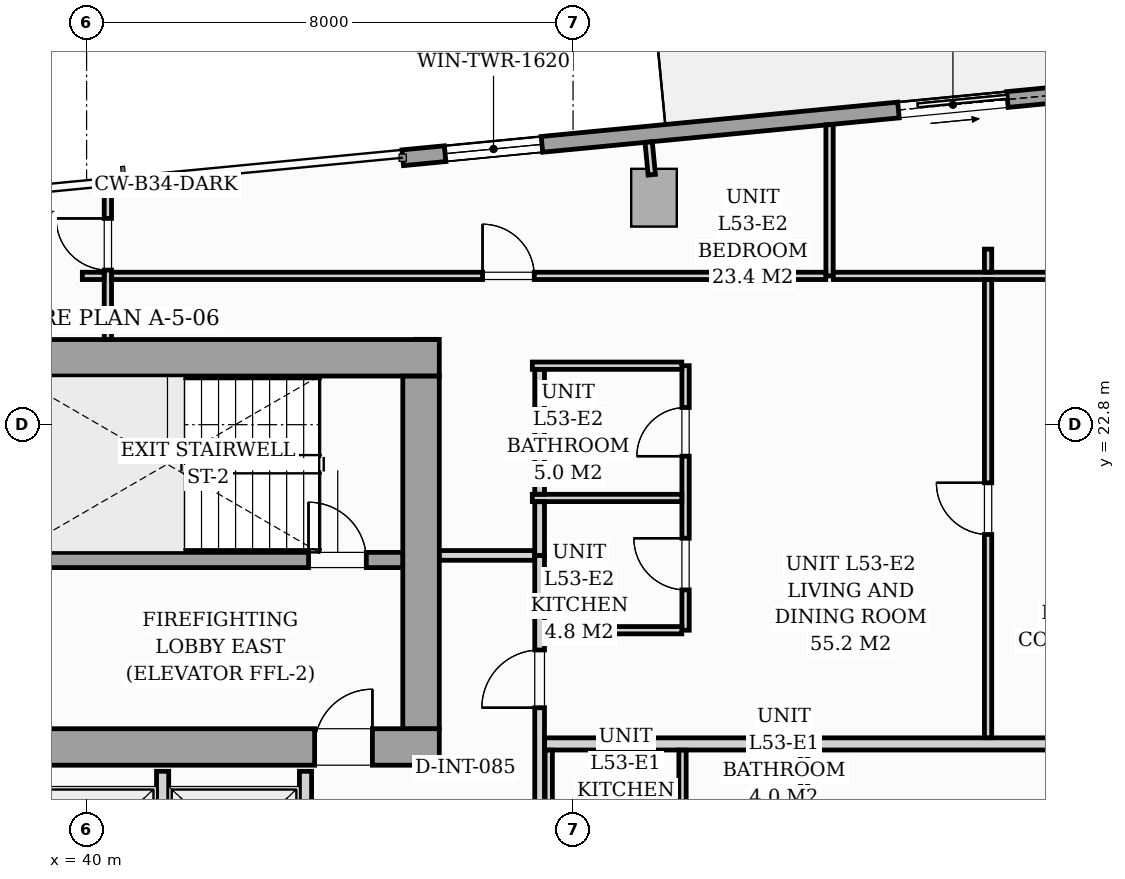
"""IFC4 building model, lengths in metres.
Left out: names, types, materials, properties, quantities, classifications, styles, units other than length and angle.
Written with IfcOpenShell. Run it as: python <this file> out.ifc"""

import sys

from ifc_helpers import new_model, si_unit, direction, frame, frame_2d, origin, origin_2d, place, context, subcontext, project, spatial, rectangle, i_section, extrude, source, transform, mapped, element, fill, save


model = new_model("IFC4")
c1 = context("Model", 3, precision=1e-05, world=origin(), true_north=direction((0.0, 1.0)))
c2 = subcontext(c1, "Body", "Model", "MODEL_VIEW")
j1 = project(units=[si_unit("LENGTHUNIT", "METRE"), si_unit("PLANEANGLEUNIT", "RADIAN")], contexts=[c1])
p1 = place(None, origin())
s1 = spatial("IfcSite", under=j1, at=p1, CompositionType="ELEMENT")
p2 = place(p1, origin())
s2 = spatial("IfcBuilding", under=s1, at=p2, CompositionType="ELEMENT")
p3 = place(p2, frame((0.0, 0.0, 185.8)))
s3 = spatial("IfcBuildingStorey", under=s2, at=p3, CompositionType="ELEMENT", Elevation=185.8)
m1 = source(origin(), c2, "Body", "SweptSolid", [
    extrude(i_section(OverallWidth=0.416, OverallDepth=0.446, WebThickness=0.039, FlangeThickness=0.063, FilletRadius=0.018, at=origin_2d()), origin(), (0.0, 0.0, 1.0), 3.196),
])
for number, where, z_axis, x_axis in (
    (1, (45.6, 17.4, 0.002), (0.0, 0.0, 1.0), (1.0, 0.0, 0.0)),
    (2, (45.6, 24.0, 0.002), (0.0, 0.0, 1.0), (1.0, 0.0, 0.0)),
):
    element("IfcColumn", number, at=place(p3, frame(where, z_axis=z_axis, x_axis=x_axis)), inside=s3, PredefinedType="PILASTER", context=c2, shape_type="MappedRepresentation", body=[
        mapped(m1, transform((0.0, 0.0, 0.0), scale=1.0)),
    ])
m2 = source(origin(), c2, "Body", "SweptSolid", [
    extrude(rectangle(XDim=0.75, YDim=0.95, at=origin_2d()), origin(), (0.0, 0.0, 1.0), 3.196),
])
p4 = place(p3, frame((49.331, 26.533, 0.002), z_axis=(0.0, 0.0, 1.0), x_axis=(0.995396198367, 0.09584575252, 0.0)))
e3 = element("IfcColumn", 3, at=p4, inside=s3, PredefinedType="COLUMN", context=c2, shape_type="MappedRepresentation", body=[
    mapped(m2, transform((0.0, 0.0, 0.0), scale=1.0)),
])
p5 = place(p3, frame((45.199, 27.19, 0.0), z_axis=(0.0, 0.0, 1.0), x_axis=(0.995397074604, 0.095836652014, 0.0)))
e4 = element("IfcWall", 4, at=p5, inside=s3, PredefinedType="STANDARD", context=c2, shape_type="SweptSolid", body=[
    extrude(rectangle(XDim=16.1, YDim=0.26, at=frame_2d((8.05, 0.0))), origin(), (0.0, 0.0, 1.0), 2.94),
])
p6 = place(p5, frame((8.19, 0.0, 0.0)))
e5 = element("IfcOpeningElement", 5, at=p6, cuts=e4, PredefinedType="OPENING", context=c2, shape_type="SweptSolid", body=[
    extrude(rectangle(XDim=1.8, YDim=2.06, at=frame_2d((0.9, 1.03))), frame((0.0, 0.14, 0.0), z_axis=(0.0, -1.0, 0.0), x_axis=(1.0, 0.0, 0.0)), (0.0, 0.0, 1.0), 0.28),
])
p7 = place(p5, frame((0.7, 0.0, 0.65)))
e6 = element("IfcOpeningElement", 6, at=p7, cuts=e4, PredefinedType="OPENING", context=c2, shape_type="SweptSolid", body=[
    extrude(rectangle(XDim=1.6, YDim=1.5, at=frame_2d((0.8, 0.75))), frame((0.0, 0.14, 0.0), z_axis=(0.0, -1.0, 0.0), x_axis=(1.0, 0.0, 0.0)), (0.0, 0.0, 1.0), 0.28),
])
p8 = place(p3, frame((26.2, 17.5, 0.0), z_axis=(0.0, 0.0, 1.0), x_axis=(1.0, 0.0, 0.0)))
e7 = element("IfcWall", 7, at=p8, inside=s3, PredefinedType="SHEAR", context=c2, shape_type="SweptSolid", body=[
    extrude(rectangle(XDim=19.6, YDim=0.6, at=frame_2d((9.8, 0.0))), origin(), (0.0, 0.0, 1.0), 3.2),
])
p9 = place(p8, frame((0.95, 0.0, 0.0)))
e8 = element("IfcOpeningElement", 8, at=p9, cuts=e7, PredefinedType="OPENING", context=c2, shape_type="SweptSolid", body=[
    extrude(rectangle(XDim=0.95, YDim=2.06, at=frame_2d((0.475, 1.03))), frame((0.0, 0.31, 0.0), z_axis=(0.0, -1.0, 0.0), x_axis=(1.0, 0.0, 0.0)), (0.0, 0.0, 1.0), 0.62),
])
p10 = place(p8, frame((9.38, 0.0, 0.0)))
e9 = element("IfcOpeningElement", 9, at=p10, cuts=e7, PredefinedType="OPENING", context=c2, shape_type="SweptSolid", body=[
    extrude(rectangle(XDim=0.85, YDim=2.0, at=frame_2d((0.425, 1.0))), frame((0.0, 0.31, 0.0), z_axis=(0.0, -1.0, 0.0), x_axis=(1.0, 0.0, 0.0)), (0.0, 0.0, 1.0), 0.62),
])
p11 = place(p8, frame((17.55, 0.0, 0.0)))
e10 = element("IfcOpeningElement", 10, at=p11, cuts=e7, PredefinedType="OPENING", context=c2, shape_type="SweptSolid", body=[
    extrude(rectangle(XDim=0.95, YDim=2.06, at=frame_2d((0.475, 1.03))), frame((0.0, 0.31, 0.0), z_axis=(0.0, -1.0, 0.0), x_axis=(1.0, 0.0, 0.0)), (0.0, 0.0, 1.0), 0.62),
])
p12 = place(p3, frame((26.2, 23.9, 0.0), z_axis=(0.0, 0.0, 1.0), x_axis=(1.0, 0.0, 0.0)))
e11 = element("IfcWall", 11, at=p12, inside=s3, PredefinedType="SHEAR", context=c2, shape_type="SweptSolid", body=[
    extrude(rectangle(XDim=19.6, YDim=0.6, at=frame_2d((9.8, 0.0))), origin(), (0.0, 0.0, 1.0), 3.2),
])
p13 = place(p3, frame((45.5, 17.802, 0.0), z_axis=(0.0, 0.0, 1.0), x_axis=(0.0, 1.0, 0.0)))
e12 = element("IfcWall", 12, at=p13, inside=s3, PredefinedType="SHEAR", context=c2, shape_type="SweptSolid", body=[
    extrude(rectangle(XDim=5.796, YDim=0.6, at=frame_2d((2.898, 0.0))), origin(), (0.0, 0.0, 1.0), 3.2),
])
p14 = place(p3, frame((37.05, 20.575, 0.0), z_axis=(0.0, 0.0, 1.0), x_axis=(1.0, 0.0, 0.0)))
e13 = element("IfcWall", 13, at=p14, inside=s3, PredefinedType="SOLIDWALL", context=c2, shape_type="SweptSolid", body=[
    extrude(rectangle(XDim=8.148, YDim=0.25, at=frame_2d((4.074, 0.0))), origin(), (0.0, 0.0, 1.0), 3.2),
])
p15 = place(p14, frame((6.6, 0.0, 0.0)))
e14 = element("IfcOpeningElement", 14, at=p15, cuts=e13, PredefinedType="OPENING", context=c2, shape_type="SweptSolid", body=[
    extrude(rectangle(XDim=0.95, YDim=2.06, at=frame_2d((0.475, 1.03))), frame((0.0, 0.135, 0.0), z_axis=(0.0, -1.0, 0.0), x_axis=(1.0, 0.0, 0.0)), (0.0, 0.0, 1.0), 0.27),
])
for number, where, z_axis, x_axis in (
    (15, (41.25, 14.75, 0.0), (0.0, 0.0, 1.0), (0.0, 1.0, 0.0)),
    (16, (43.6, 14.75, 0.0), (0.0, 0.0, 1.0), (0.0, 1.0, 0.0)),
):
    element("IfcWall", number, at=place(p3, frame(where, z_axis=z_axis, x_axis=x_axis)), inside=s3, PredefinedType="PARTITIONING", context=c2, shape_type="SweptSolid", body=[
        extrude(rectangle(XDim=2.35, YDim=0.2, at=frame_2d((1.175, 0.0))), origin(), (0.0, 0.0, 1.0), 2.94),
    ])
p16 = place(p3, frame((47.45, 13.362, 0.0), z_axis=(0.0, 0.0, 1.0), x_axis=(0.0, 1.0, 0.0)))
e17 = element("IfcWall", 17, at=p16, inside=s3, PredefinedType="PARTITIONING", context=c2, shape_type="SweptSolid", body=[
    extrude(rectangle(XDim=7.288, YDim=0.16, at=frame_2d((3.644, 0.0))), origin(), (0.0, 0.0, 1.0), 2.94),
])
p17 = place(p16, frame((0.493, 0.0, 0.0)))
e18 = element("IfcOpeningElement", 18, at=p17, cuts=e17, PredefinedType="OPENING", context=c2, shape_type="SweptSolid", body=[
    extrude(rectangle(XDim=0.95, YDim=2.06, at=frame_2d((0.475, 1.03))), frame((0.0, 0.09, 0.0), z_axis=(0.0, -1.0, 0.0), x_axis=(1.0, 0.0, 0.0)), (0.0, 0.0, 1.0), 0.18),
])
p18 = place(p16, frame((4.783, 0.0, 0.0)))
e19 = element("IfcOpeningElement", 19, at=p18, cuts=e17, PredefinedType="OPENING", context=c2, shape_type="SweptSolid", body=[
    extrude(rectangle(XDim=0.95, YDim=2.06, at=frame_2d((0.475, 1.03))), frame((0.0, 0.09, 0.0), z_axis=(0.0, -1.0, 0.0), x_axis=(1.0, 0.0, 0.0)), (0.0, 0.0, 1.0), 0.18),
])
p19 = place(p3, frame((45.802, 20.65, 0.0), z_axis=(0.0, 0.0, 1.0), x_axis=(1.0, 0.0, 0.0)))
e20 = element("IfcWall", 20, at=p19, inside=s3, PredefinedType="PARTITIONING", context=c2, shape_type="SweptSolid", body=[
    extrude(rectangle(XDim=1.566, YDim=0.16, at=frame_2d((0.783, 0.0))), origin(), (0.0, 0.0, 1.0), 2.94),
])
p20 = place(p3, frame((47.532, 17.55, 0.0), z_axis=(0.0, 0.0, 1.0), x_axis=(1.0, 0.0, 0.0)))
e21 = element("IfcWall", 21, at=p20, inside=s3, PredefinedType="PARTITIONING", context=c2, shape_type="SweptSolid", body=[
    extrude(rectangle(XDim=17.201, YDim=0.2, at=frame_2d((8.601, 0.0))), origin(), (0.0, 0.0, 1.0), 2.281),
])
for number, where, z_axis, x_axis in (
    (22, (47.6, 15.262, 0.0), (0.0, 0.0, 1.0), (0.0, 1.0, 0.0)),
    (23, (49.8, 15.262, 0.0), (0.0, 0.0, 1.0), (0.0, 1.0, 0.0)),
    (24, (51.8, 15.262, 0.0), (0.0, 0.0, 1.0), (0.0, 1.0, 0.0)),
):
    element("IfcWall", number, at=place(p3, frame(where, z_axis=z_axis, x_axis=x_axis)), inside=s3, PredefinedType="PARTITIONING", context=c2, shape_type="SweptSolid", body=[
        extrude(rectangle(XDim=2.186, YDim=0.12, at=frame_2d((1.093, 0.0))), origin(), (0.0, 0.0, 1.0), 2.94),
    ])
p21 = place(p3, frame((49.85, 19.42, 0.0), z_axis=(0.0, 0.0, 1.0), x_axis=(0.0, 1.0, 0.0)))
e25 = element("IfcWall", 25, at=p21, inside=s3, PredefinedType="PARTITIONING", context=c2, shape_type="SweptSolid", body=[
    extrude(rectangle(XDim=4.35, YDim=0.12, at=frame_2d((2.175, 0.0))), origin(), (0.0, 0.0, 1.0), 2.94),
])
p22 = place(p21, frame((0.663, 0.0, 0.0)))
e26 = element("IfcOpeningElement", 26, at=p22, cuts=e25, PredefinedType="OPENING", context=c2, shape_type="SweptSolid", body=[
    extrude(rectangle(XDim=0.85, YDim=2.05, at=frame_2d((0.425, 1.025))), frame((0.0, 0.07, 0.0), z_axis=(0.0, -1.0, 0.0), x_axis=(1.0, 0.0, 0.0)), (0.0, 0.0, 1.0), 0.14),
])
p23 = place(p21, frame((2.862, 0.0, 0.0)))
e27 = element("IfcOpeningElement", 27, at=p23, cuts=e25, PredefinedType="OPENING", context=c2, shape_type="SweptSolid", body=[
    extrude(rectangle(XDim=0.8, YDim=2.02, at=frame_2d((0.4, 1.01))), frame((0.0, 0.07, 0.0), z_axis=(0.0, -1.0, 0.0), x_axis=(1.0, 0.0, 0.0)), (0.0, 0.0, 1.0), 0.14),
])
p24 = place(p3, frame((47.33, 21.595, 0.0), z_axis=(0.0, 0.0, 1.0), x_axis=(1.0, 0.0, 0.0)))
e28 = element("IfcWall", 28, at=p24, inside=s3, PredefinedType="PARTITIONING", context=c2, shape_type="SweptSolid", body=[
    extrude(rectangle(XDim=2.458, YDim=0.12, at=frame_2d((1.229, 0.0))), origin(), (0.0, 0.0, 1.0), 2.94),
])
p25 = place(p3, frame((47.532, 19.42, 0.0), z_axis=(0.0, 0.0, 1.0), x_axis=(1.0, 0.0, 0.0)))
e29 = element("IfcWall", 29, at=p25, inside=s3, PredefinedType="PARTITIONING", context=c2, shape_type="SweptSolid", body=[
    extrude(rectangle(XDim=2.256, YDim=0.12, at=frame_2d((1.128, 0.0))), origin(), (0.0, 0.0, 1.0), 2.94),
])
p26 = place(p3, frame((47.33, 23.77, 0.0), z_axis=(0.0, 0.0, 1.0), x_axis=(1.0, 0.0, 0.0)))
e30 = element("IfcWall", 30, at=p26, inside=s3, PredefinedType="PARTITIONING", context=c2, shape_type="SweptSolid", body=[
    extrude(rectangle(XDim=2.458, YDim=0.12, at=frame_2d((1.229, 0.0))), origin(), (0.0, 0.0, 1.0), 2.94),
])
p27 = place(p3, frame((47.45, 20.65, 0.0), z_axis=(0.0, 0.0, 1.0), x_axis=(0.0, 1.0, 0.0)))
e31 = element("IfcWall", 31, at=p27, inside=s3, PredefinedType="PARTITIONING", context=c2, shape_type="SweptSolid", body=[
    extrude(rectangle(XDim=0.883, YDim=0.16, at=frame_2d((0.441, 0.0))), origin(), (0.0, 0.0, 1.0), 2.94),
])
p28 = place(p3, frame((47.45, 21.657, 0.0), z_axis=(0.0, 0.0, 1.0), x_axis=(0.0, 1.0, 0.0)))
e32 = element("IfcWall", 32, at=p28, inside=s3, PredefinedType="PARTITIONING", context=c2, shape_type="SweptSolid", body=[
    extrude(rectangle(XDim=2.051, YDim=0.16, at=frame_2d((1.025, 0.0))), origin(), (0.0, 0.0, 1.0), 2.94),
])
p29 = place(p3, frame((40.35, 24.202, 0.0), z_axis=(0.0, 0.0, 1.0), x_axis=(0.0, 1.0, 0.0)))
e33 = element("IfcWall", 33, at=p29, inside=s3, PredefinedType="PARTITIONING", context=c2, shape_type="SweptSolid", body=[
    extrude(rectangle(XDim=2.571, YDim=0.12, at=frame_2d((1.286, 0.0))), origin(), (0.0, 0.0, 1.0), 2.94),
])
p30 = place(p29, frame((1.14, 0.0, 0.0)))
e34 = element("IfcOpeningElement", 34, at=p30, cuts=e33, PredefinedType="OPENING", context=c2, shape_type="SweptSolid", body=[
    extrude(rectangle(XDim=0.85, YDim=2.05, at=frame_2d((0.425, 1.025))), frame((0.0, 0.07, 0.0), z_axis=(0.0, -1.0, 0.0), x_axis=(1.0, 0.0, 0.0)), (0.0, 0.0, 1.0), 0.14),
])
p31 = place(p3, frame((52.218, 25.247, 0.0), z_axis=(0.0, 0.0, 1.0), x_axis=(0.0, 1.0, 0.0)))
e35 = element("IfcWall", 35, at=p31, inside=s3, PredefinedType="PARTITIONING", context=c2, shape_type="SweptSolid", body=[
    extrude(rectangle(XDim=2.486, YDim=0.12, at=frame_2d((1.243, 0.0))), origin(), (0.0, 0.0, 1.0), 2.94),
])
p32 = place(p3, frame((39.93, 25.247, 0.0), z_axis=(0.0, 0.0, 1.0), x_axis=(1.0, 0.0, 0.0)))
e36 = element("IfcWall", 36, at=p32, inside=s3, PredefinedType="PARTITIONING", context=c2, shape_type="SweptSolid", body=[
    extrude(rectangle(XDim=0.358, YDim=0.12, at=frame_2d((0.179, 0.0))), origin(), (0.0, 0.0, 1.0), 2.94),
])
p33 = place(p3, frame((40.412, 25.247, 0.0), z_axis=(0.0, 0.0, 1.0), x_axis=(1.0, 0.0, 0.0)))
e37 = element("IfcWall", 37, at=p33, inside=s3, PredefinedType="PARTITIONING", context=c2, shape_type="SweptSolid", body=[
    extrude(rectangle(XDim=11.744, YDim=0.12, at=frame_2d((5.872, 0.0))), origin(), (0.0, 0.0, 1.0), 2.94),
])
p34 = place(p33, frame((6.1, 0.0, 0.0)))
e38 = element("IfcOpeningElement", 38, at=p34, cuts=e37, PredefinedType="OPENING", context=c2, shape_type="SweptSolid", body=[
    extrude(rectangle(XDim=0.85, YDim=2.05, at=frame_2d((0.425, 1.025))), frame((0.0, 0.07, 0.0), z_axis=(0.0, -1.0, 0.0), x_axis=(1.0, 0.0, 0.0)), (0.0, 0.0, 1.0), 0.14),
])
p35 = place(p3, frame((52.28, 25.247, 0.0), z_axis=(0.0, 0.0, 1.0), x_axis=(1.0, 0.0, 0.0)))
e39 = element("IfcWall", 39, at=p35, inside=s3, PredefinedType="PARTITIONING", context=c2, shape_type="SweptSolid", body=[
    extrude(rectangle(XDim=11.712, YDim=0.12, at=frame_2d((5.856, 0.0))), origin(), (0.0, 0.0, 1.0), 2.94),
])
p36 = place(p35, frame((5.247, 0.0, 0.0)))
e40 = element("IfcOpeningElement", 40, at=p36, cuts=e39, PredefinedType="OPENING", context=c2, shape_type="SweptSolid", body=[
    extrude(rectangle(XDim=0.85, YDim=2.05, at=frame_2d((0.425, 1.025))), frame((0.0, 0.07, 0.0), z_axis=(0.0, -1.0, 0.0), x_axis=(1.0, 0.0, 0.0)), (0.0, 0.0, 1.0), 0.14),
])
p37 = place(p3, frame((54.825, 17.652, 0.0), z_axis=(0.0, 0.0, 1.0), x_axis=(0.0, 1.0, 0.0)))
e41 = element("IfcWall", 41, at=p37, inside=s3, PredefinedType="PARTITIONING", context=c2, shape_type="SweptSolid", body=[
    extrude(rectangle(XDim=7.533, YDim=0.12, at=frame_2d((3.767, 0.0))), origin(), (0.0, 0.0, 1.0), 2.94),
])
p38 = place(p37, frame((3.342, 0.0, 0.0)))
e42 = element("IfcOpeningElement", 42, at=p38, cuts=e41, PredefinedType="OPENING", context=c2, shape_type="SweptSolid", body=[
    extrude(rectangle(XDim=0.85, YDim=2.05, at=frame_2d((0.425, 1.025))), frame((0.0, 0.07, 0.0), z_axis=(0.0, -1.0, 0.0), x_axis=(1.0, 0.0, 0.0)), (0.0, 0.0, 1.0), 0.14),
])
p39 = place(p3, frame((54.825, 25.309, 0.0), z_axis=(0.0, 0.0, 1.0), x_axis=(0.0, 1.0, 0.0)))
e43 = element("IfcWall", 43, at=p39, inside=s3, PredefinedType="PARTITIONING", context=c2, shape_type="SweptSolid", body=[
    extrude(rectangle(XDim=0.378, YDim=0.12, at=frame_2d((0.189, 0.0))), origin(), (0.0, 0.0, 1.0), 2.94),
])
p40 = place(p3, frame((49.294, 26.911, 0.0), z_axis=(0.0, 0.0, 1.0), x_axis=(-0.095772948675, 0.995403205893, 0.0)))
e44 = element("IfcWall", 44, at=p40, inside=s3, PredefinedType="PARTITIONING", context=c2, shape_type="SweptSolid", body=[
    extrude(rectangle(XDim=0.538, YDim=0.12, at=frame_2d((0.269, 0.0))), origin(), (0.0, 0.0, 1.0), 2.94),
])
m3 = source(origin(), c2, "Body", "SweptSolid", [
    extrude(rectangle(XDim=1.8, YDim=2.06, at=frame_2d((0.9, 1.03))), frame((0.0, 0.025, 0.0), z_axis=(0.0, -1.0, 0.0), x_axis=(1.0, 0.0, 0.0)), (0.0, 0.0, 1.0), 0.05),
])
p41 = place(p6, origin())
e45 = element("IfcDoor", 45, at=p41, inside=s3, OperationType="SLIDING_TO_RIGHT", PredefinedType="DOOR", context=c2, shape_type="MappedRepresentation", body=[
    mapped(m3, transform((0.0, 0.0, 0.0), scale=1.0)),
])
fill(e5, e45)
m4 = source(origin(), c2, "Body", "SweptSolid", [
    extrude(rectangle(XDim=1.6, YDim=1.5, at=frame_2d((0.8, 0.75))), frame((0.0, 0.03, 0.0), z_axis=(0.0, -1.0, 0.0), x_axis=(1.0, 0.0, 0.0)), (0.0, 0.0, 1.0), 0.06),
])
p42 = place(p7, origin())
e46 = element("IfcWindow", 46, at=p42, inside=s3, PartitioningType="SINGLE_PANEL", PredefinedType="WINDOW", context=c2, shape_type="MappedRepresentation", body=[
    mapped(m4, transform((0.0, 0.0, 0.0), scale=1.0)),
])
fill(e6, e46)
m5 = source(origin(), c2, "Body", "SweptSolid", [
    extrude(rectangle(XDim=0.95, YDim=2.06, at=frame_2d((0.475, 1.03))), frame((0.0, 0.025, 0.0), z_axis=(0.0, -1.0, 0.0), x_axis=(1.0, 0.0, 0.0)), (0.0, 0.0, 1.0), 0.05),
])
p43 = place(p11, origin())
e47 = element("IfcDoor", 47, at=p43, inside=s3, OperationType="SINGLE_SWING_RIGHT", PredefinedType="DOOR", context=c2, shape_type="MappedRepresentation", body=[
    mapped(m5, transform((0.0, 0.0, 0.0), scale=1.0)),
])
fill(e10, e47)
p44 = place(p15, origin())
e48 = element("IfcDoor", 48, at=p44, inside=s3, OperationType="SINGLE_SWING_LEFT", PredefinedType="DOOR", context=c2, shape_type="MappedRepresentation", body=[
    mapped(m5, transform((0.0, 0.0, 0.0), scale=1.0)),
])
fill(e14, e48)
m6 = source(origin(), c2, "Body", "SweptSolid", [
    extrude(rectangle(XDim=0.95, YDim=2.06, at=frame_2d((0.475, 1.03))), frame((0.0, 0.025, 0.0), z_axis=(0.0, -1.0, 0.0), x_axis=(1.0, 0.0, 0.0)), (0.0, 0.0, 1.0), 0.05),
])
p45 = place(p18, origin())
e49 = element("IfcDoor", 49, at=p45, inside=s3, OperationType="SINGLE_SWING_LEFT", PredefinedType="DOOR", context=c2, shape_type="MappedRepresentation", body=[
    mapped(m6, transform((0.0, 0.0, 0.0), scale=1.0)),
])
fill(e19, e49)
m7 = source(origin(), c2, "Body", "SweptSolid", [
    extrude(rectangle(XDim=0.85, YDim=2.05, at=frame_2d((0.425, 1.025))), frame((0.0, 0.025, 0.0), z_axis=(0.0, -1.0, 0.0), x_axis=(1.0, 0.0, 0.0)), (0.0, 0.0, 1.0), 0.05),
])
p46 = place(p22, origin())
e50 = element("IfcDoor", 50, at=p46, inside=s3, OperationType="SINGLE_SWING_RIGHT", PredefinedType="DOOR", context=c2, shape_type="MappedRepresentation", body=[
    mapped(m7, transform((0.0, 0.0, 0.0), scale=1.0)),
])
fill(e26, e50)
m8 = source(origin(), c2, "Body", "SweptSolid", [
    extrude(rectangle(XDim=0.8, YDim=2.02, at=frame_2d((0.4, 1.01))), frame((0.0, 0.025, 0.0), z_axis=(0.0, -1.0, 0.0), x_axis=(1.0, 0.0, 0.0)), (0.0, 0.0, 1.0), 0.05),
])
p47 = place(p23, origin())
e51 = element("IfcDoor", 51, at=p47, inside=s3, OperationType="SINGLE_SWING_LEFT", PredefinedType="DOOR", context=c2, shape_type="MappedRepresentation", body=[
    mapped(m8, transform((0.0, 0.0, 0.0), scale=1.0)),
])
fill(e27, e51)
p48 = place(p30, origin())
e52 = element("IfcDoor", 52, at=p48, inside=s3, OperationType="SINGLE_SWING_RIGHT", PredefinedType="DOOR", context=c2, shape_type="MappedRepresentation", body=[
    mapped(m7, transform((0.0, 0.0, 0.0), scale=1.0)),
])
fill(e34, e52)
p49 = place(p34, origin())
e53 = element("IfcDoor", 53, at=p49, inside=s3, OperationType="SINGLE_SWING_LEFT", PredefinedType="DOOR", context=c2, shape_type="MappedRepresentation", body=[
    mapped(m7, transform((0.0, 0.0, 0.0), scale=1.0)),
])
fill(e38, e53)
p50 = place(p38, origin())
e54 = element("IfcDoor", 54, at=p50, inside=s3, OperationType="SINGLE_SWING_RIGHT", PredefinedType="DOOR", context=c2, shape_type="MappedRepresentation", body=[
    mapped(m7, transform((0.0, 0.0, 0.0), scale=1.0)),
])
fill(e42, e54)
save(model, sys.argv[1])
